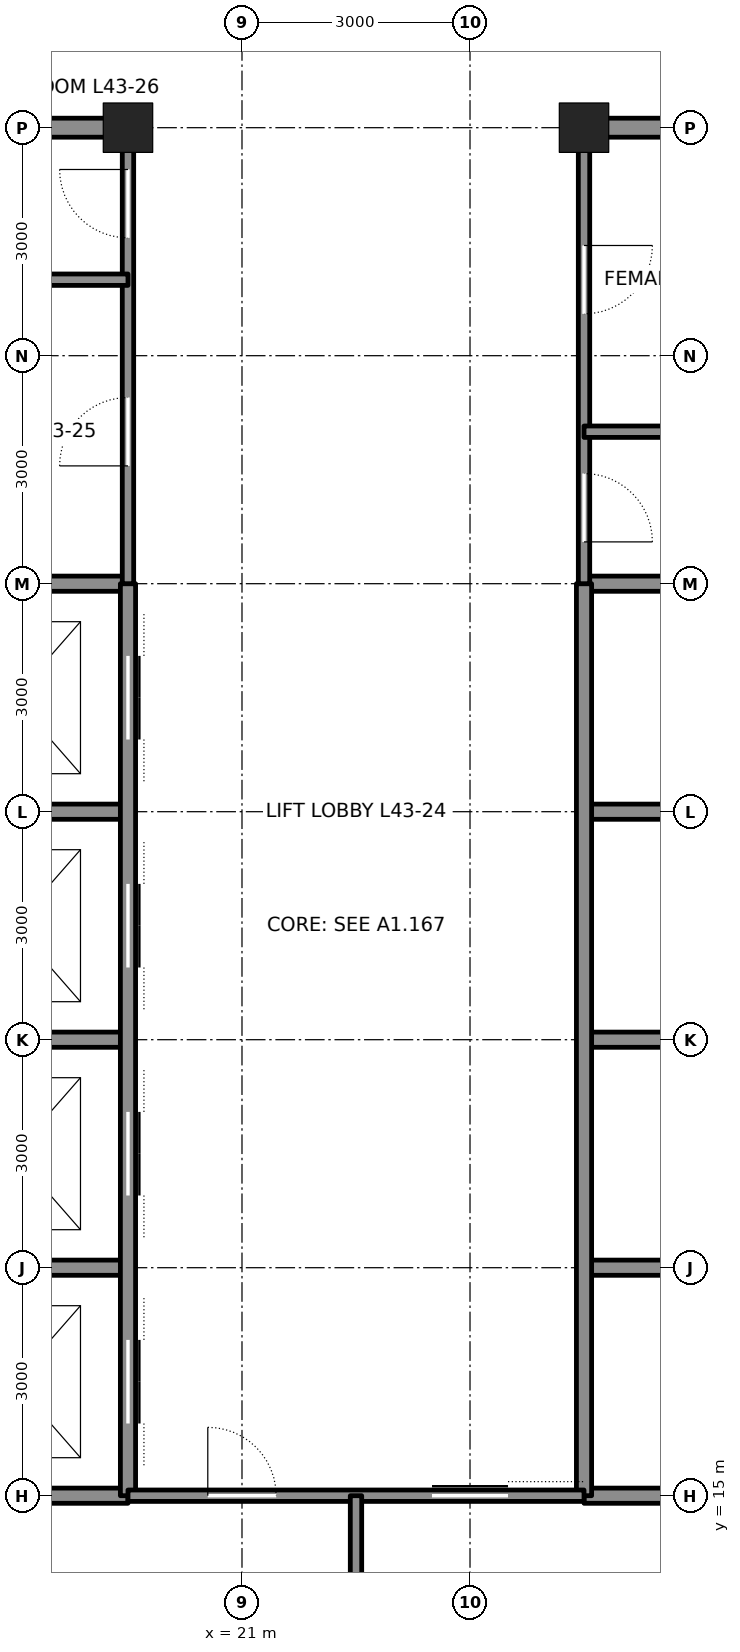
"""IFC4 building model, lengths in metres.
Left out: names, types, materials, properties, quantities, classifications, styles, units other than length and angle.
Written with IfcOpenShell. Run it as: python <this file> out.ifc"""

import sys

from ifc_helpers import new_model, si_unit, direction, frame, frame_2d, origin, origin_2d, place, context, subcontext, project, spatial, rectangle, hollow_rectangle, extrude, element, fill, save


model = new_model("IFC4")
c1 = context("Model", 3, precision=1e-05, world=origin(), true_north=direction((0.0, 1.0)))
c2 = subcontext(c1, "Body", "Model", "MODEL_VIEW")
j1 = project(units=[si_unit("LENGTHUNIT", "METRE"), si_unit("PLANEANGLEUNIT", "RADIAN")], contexts=[c1])
p1 = place(None, origin())
s1 = spatial("IfcSite", under=j1, at=p1, CompositionType="ELEMENT")
p2 = place(p1, origin())
s2 = spatial("IfcBuilding", under=s1, at=p2, CompositionType="ELEMENT")
p3 = place(p2, frame((0.0, 0.0, 197.1)))
s3 = spatial("IfcBuildingStorey", under=s2, at=p3, CompositionType="ELEMENT", Elevation=197.1)
for number, where, z_axis, x_axis in (
    (1, (19.5, 33.0, 0.0), (0.0, 0.0, 1.0), (1.0, 0.0, 0.0)),
    (2, (25.5, 33.0, 0.0), (0.0, 0.0, 1.0), (1.0, 0.0, 0.0)),
):
    element("IfcColumn", number, at=place(p3, frame(where, z_axis=z_axis, x_axis=x_axis)), inside=s3, PredefinedType="COLUMN", context=c2, shape_type="SweptSolid", body=[
        extrude(hollow_rectangle(XDim=0.65, YDim=0.65, WallThickness=0.065, at=origin_2d()), origin(), (0.0, 0.0, 1.0), 4.2),
    ])
for number, where, z_axis, x_axis in (
    (3, (12.0, 15.0, 0.0), (0.0, 0.0, 1.0), (1.0, 0.0, 0.0)),
    (4, (25.5, 15.0, 0.0), (0.0, 0.0, 1.0), (1.0, 0.0, 0.0)),
):
    element("IfcWall", number, at=place(p3, frame(where, z_axis=z_axis, x_axis=x_axis)), inside=s3, PredefinedType="SOLIDWALL", context=c2, shape_type="SweptSolid", body=[
        extrude(rectangle(XDim=7.5, YDim=0.2, at=frame_2d((3.75, 0.0))), origin(), (0.0, 0.0, 1.0), 4.04),
    ])
for number, where, z_axis, x_axis in (
    (5, (16.75, 24.0, 0.0), (0.0, 0.0, 1.0), (1.0, 0.0, 0.0)),
    (6, (25.5, 24.0, 0.0), (0.0, 0.0, 1.0), (1.0, 0.0, 0.0)),
):
    element("IfcWall", number, at=place(p3, frame(where, z_axis=z_axis, x_axis=x_axis)), inside=s3, PredefinedType="SOLIDWALL", context=c2, shape_type="SweptSolid", body=[
        extrude(rectangle(XDim=2.75, YDim=0.2, at=frame_2d((1.375, 0.0))), origin(), (0.0, 0.0, 1.0), 3.09),
    ])
p4 = place(p3, frame((12.0, 27.0, 0.0), z_axis=(0.0, 0.0, 1.0), x_axis=(1.0, 0.0, 0.0)))
e7 = element("IfcWall", 7, at=p4, inside=s3, PredefinedType="SOLIDWALL", context=c2, shape_type="SweptSolid", body=[
    extrude(rectangle(XDim=7.5, YDim=0.2, at=frame_2d((3.75, 0.0))), origin(), (0.0, 0.0, 1.0), 4.04),
])
p5 = place(p4, frame((1.65, 0.0, 0.0)))
e8 = element("IfcOpeningElement", 8, at=p5, cuts=e7, PredefinedType="OPENING", context=c2, shape_type="SweptSolid", body=[
    extrude(rectangle(XDim=1.2, YDim=2.1, at=frame_2d((0.6, 1.05))), frame((0.0, 0.11, 0.0), z_axis=(0.0, -1.0, 0.0), x_axis=(1.0, 0.0, 0.0)), (0.0, 0.0, 1.0), 0.22),
])
p6 = place(p3, frame((25.5, 27.0, 0.0), z_axis=(0.0, 0.0, 1.0), x_axis=(1.0, 0.0, 0.0)))
e9 = element("IfcWall", 9, at=p6, inside=s3, PredefinedType="SOLIDWALL", context=c2, shape_type="SweptSolid", body=[
    extrude(rectangle(XDim=3.0, YDim=0.2, at=frame_2d((1.5, 0.0))), origin(), (0.0, 0.0, 1.0), 4.04),
])
for number, where, z_axis, x_axis in (
    (10, (16.75, 33.0, 0.0), (0.0, 0.0, 1.0), (1.0, 0.0, 0.0)),
    (11, (25.75, 33.0, 0.0), (0.0, 0.0, 1.0), (1.0, 0.0, 0.0)),
):
    element("IfcWall", number, at=place(p3, frame(where, z_axis=z_axis, x_axis=x_axis)), inside=s3, PredefinedType="SOLIDWALL", context=c2, shape_type="SweptSolid", body=[
        extrude(rectangle(XDim=2.5, YDim=0.25, at=frame_2d((1.25, 0.0))), origin(), (0.0, 0.0, 1.0), 3.181),
    ])
p7 = place(p3, frame((16.5, 18.0, 0.0), z_axis=(0.0, 0.0, 1.0), x_axis=(1.0, 0.0, 0.0)))
e12 = element("IfcWall", 12, at=p7, inside=s3, PredefinedType="SOLIDWALL", context=c2, shape_type="SweptSolid", body=[
    extrude(rectangle(XDim=3.0, YDim=0.2, at=frame_2d((1.5, 0.0))), origin(), (0.0, 0.0, 1.0), 4.04),
])
p8 = place(p3, frame((25.5, 18.0, 0.0), z_axis=(0.0, 0.0, 1.0), x_axis=(1.0, 0.0, 0.0)))
e13 = element("IfcWall", 13, at=p8, inside=s3, PredefinedType="SOLIDWALL", context=c2, shape_type="SweptSolid", body=[
    extrude(rectangle(XDim=7.5, YDim=0.2, at=frame_2d((3.75, 0.0))), origin(), (0.0, 0.0, 1.0), 4.04),
])
p9 = place(p8, frame((4.65, 0.0, 0.0)))
e14 = element("IfcOpeningElement", 14, at=p9, cuts=e13, PredefinedType="OPENING", context=c2, shape_type="SweptSolid", body=[
    extrude(rectangle(XDim=1.2, YDim=2.1, at=frame_2d((0.6, 1.05))), frame((0.0, 0.11, 0.0), z_axis=(0.0, -1.0, 0.0), x_axis=(1.0, 0.0, 0.0)), (0.0, 0.0, 1.0), 0.22),
])
for number, where, z_axis, x_axis in (
    (15, (16.75, 21.0, 0.0), (0.0, 0.0, 1.0), (1.0, 0.0, 0.0)),
    (16, (25.5, 21.0, 0.0), (0.0, 0.0, 1.0), (1.0, 0.0, 0.0)),
):
    element("IfcWall", number, at=place(p3, frame(where, z_axis=z_axis, x_axis=x_axis)), inside=s3, PredefinedType="SOLIDWALL", context=c2, shape_type="SweptSolid", body=[
        extrude(rectangle(XDim=2.75, YDim=0.2, at=frame_2d((1.375, 0.0))), origin(), (0.0, 0.0, 1.0), 3.09),
    ])
p10 = place(p3, frame((19.5, 15.0, 0.0), z_axis=(0.0, 0.0, 1.0), x_axis=(0.0, 1.0, 0.0)))
e17 = element("IfcWall", 17, at=p10, inside=s3, PredefinedType="SOLIDWALL", context=c2, shape_type="SweptSolid", body=[
    extrude(rectangle(XDim=12.0, YDim=0.2, at=frame_2d((6.0, 0.0))), origin(), (0.0, 0.0, 1.0), 3.064),
])
p11 = place(p10, frame((0.95, 0.0, 0.0)))
e18 = element("IfcOpeningElement", 18, at=p11, cuts=e17, PredefinedType="OPENING", context=c2, shape_type="SweptSolid", body=[
    extrude(rectangle(XDim=1.1, YDim=2.1, at=frame_2d((0.55, 1.05))), frame((0.0, 0.11, 0.0), z_axis=(0.0, -1.0, 0.0), x_axis=(1.0, 0.0, 0.0)), (0.0, 0.0, 1.0), 0.22),
])
p12 = place(p10, frame((3.95, 0.0, 0.0)))
e19 = element("IfcOpeningElement", 19, at=p12, cuts=e17, PredefinedType="OPENING", context=c2, shape_type="SweptSolid", body=[
    extrude(rectangle(XDim=1.1, YDim=2.1, at=frame_2d((0.55, 1.05))), frame((0.0, 0.11, 0.0), z_axis=(0.0, -1.0, 0.0), x_axis=(1.0, 0.0, 0.0)), (0.0, 0.0, 1.0), 0.22),
])
p13 = place(p10, frame((6.95, 0.0, 0.0)))
e20 = element("IfcOpeningElement", 20, at=p13, cuts=e17, PredefinedType="OPENING", context=c2, shape_type="SweptSolid", body=[
    extrude(rectangle(XDim=1.1, YDim=2.1, at=frame_2d((0.55, 1.05))), frame((0.0, 0.11, 0.0), z_axis=(0.0, -1.0, 0.0), x_axis=(1.0, 0.0, 0.0)), (0.0, 0.0, 1.0), 0.22),
])
p14 = place(p10, frame((9.95, 0.0, 0.0)))
e21 = element("IfcOpeningElement", 21, at=p14, cuts=e17, PredefinedType="OPENING", context=c2, shape_type="SweptSolid", body=[
    extrude(rectangle(XDim=1.1, YDim=2.1, at=frame_2d((0.55, 1.05))), frame((0.0, 0.11, 0.0), z_axis=(0.0, -1.0, 0.0), x_axis=(1.0, 0.0, 0.0)), (0.0, 0.0, 1.0), 0.22),
])
p15 = place(p3, frame((19.5, 27.0, 0.0), z_axis=(0.0, 0.0, 1.0), x_axis=(0.0, 1.0, 0.0)))
e22 = element("IfcWall", 22, at=p15, inside=s3, PredefinedType="PARTITIONING", context=c2, shape_type="SweptSolid", body=[
    extrude(rectangle(XDim=5.75, YDim=0.15, at=frame_2d((2.875, 0.0))), origin(), (0.0, 0.0, 1.0), 3.064),
])
p16 = place(p15, frame((1.55, 0.0, 0.0)))
e23 = element("IfcOpeningElement", 23, at=p16, cuts=e22, PredefinedType="OPENING", context=c2, shape_type="SweptSolid", body=[
    extrude(rectangle(XDim=0.9, YDim=2.1, at=frame_2d((0.45, 1.05))), frame((0.0, 0.085, 0.0), z_axis=(0.0, -1.0, 0.0), x_axis=(1.0, 0.0, 0.0)), (0.0, 0.0, 1.0), 0.17),
])
p17 = place(p15, frame((4.55, 0.0, 0.0)))
e24 = element("IfcOpeningElement", 24, at=p17, cuts=e22, PredefinedType="OPENING", context=c2, shape_type="SweptSolid", body=[
    extrude(rectangle(XDim=0.9, YDim=2.1, at=frame_2d((0.45, 1.05))), frame((0.0, 0.085, 0.0), z_axis=(0.0, -1.0, 0.0), x_axis=(1.0, 0.0, 0.0)), (0.0, 0.0, 1.0), 0.17),
])
p18 = place(p3, frame((25.5, 15.0, 0.0), z_axis=(0.0, 0.0, 1.0), x_axis=(0.0, 1.0, 0.0)))
e25 = element("IfcWall", 25, at=p18, inside=s3, PredefinedType="SOLIDWALL", context=c2, shape_type="SweptSolid", body=[
    extrude(rectangle(XDim=12.0, YDim=0.2, at=frame_2d((6.0, 0.0))), origin(), (0.0, 0.0, 1.0), 3.064),
])
p19 = place(p3, frame((25.5, 27.0, 0.0), z_axis=(0.0, 0.0, 1.0), x_axis=(0.0, 1.0, 0.0)))
e26 = element("IfcWall", 26, at=p19, inside=s3, PredefinedType="PARTITIONING", context=c2, shape_type="SweptSolid", body=[
    extrude(rectangle(XDim=5.75, YDim=0.15, at=frame_2d((2.875, 0.0))), origin(), (0.0, 0.0, 1.0), 3.064),
])
p20 = place(p19, frame((0.55, 0.0, 0.0)))
e27 = element("IfcOpeningElement", 27, at=p20, cuts=e26, PredefinedType="OPENING", context=c2, shape_type="SweptSolid", body=[
    extrude(rectangle(XDim=0.9, YDim=2.1, at=frame_2d((0.45, 1.05))), frame((0.0, 0.085, 0.0), z_axis=(0.0, -1.0, 0.0), x_axis=(1.0, 0.0, 0.0)), (0.0, 0.0, 1.0), 0.17),
])
p21 = place(p19, frame((3.55, 0.0, 0.0)))
e28 = element("IfcOpeningElement", 28, at=p21, cuts=e26, PredefinedType="OPENING", context=c2, shape_type="SweptSolid", body=[
    extrude(rectangle(XDim=0.9, YDim=2.1, at=frame_2d((0.45, 1.05))), frame((0.0, 0.085, 0.0), z_axis=(0.0, -1.0, 0.0), x_axis=(1.0, 0.0, 0.0)), (0.0, 0.0, 1.0), 0.17),
])
p22 = place(p3, frame((19.5, 15.0, 0.0), z_axis=(0.0, 0.0, 1.0), x_axis=(1.0, 0.0, 0.0)))
e29 = element("IfcWall", 29, at=p22, inside=s3, PredefinedType="PARTITIONING", context=c2, shape_type="SweptSolid", body=[
    extrude(rectangle(XDim=6.0, YDim=0.15, at=frame_2d((3.0, 0.0))), origin(), (0.0, 0.0, 1.0), 4.04),
])
p23 = place(p22, frame((4.0, 0.0, 0.0)))
e30 = element("IfcOpeningElement", 30, at=p23, cuts=e29, PredefinedType="OPENING", context=c2, shape_type="SweptSolid", body=[
    extrude(rectangle(XDim=1.0, YDim=2.1, at=frame_2d((0.5, 1.05))), frame((0.0, 0.085, 0.0), z_axis=(0.0, -1.0, 0.0), x_axis=(1.0, 0.0, 0.0)), (0.0, 0.0, 1.0), 0.17),
])
p24 = place(p22, frame((1.05, 0.0, 0.0)))
e31 = element("IfcOpeningElement", 31, at=p24, cuts=e29, PredefinedType="OPENING", context=c2, shape_type="SweptSolid", body=[
    extrude(rectangle(XDim=0.9, YDim=2.1, at=frame_2d((0.45, 1.05))), frame((0.0, 0.085, 0.0), z_axis=(0.0, -1.0, 0.0), x_axis=(1.0, 0.0, 0.0)), (0.0, 0.0, 1.0), 0.17),
])
for number, where, z_axis, x_axis in (
    (32, (22.5, 15.0, 0.0), (0.0, 0.0, 1.0), (0.0, -1.0, 0.0)),
    (33, (16.5, 31.0, 0.0), (0.0, 0.0, 1.0), (1.0, 0.0, 0.0)),
    (34, (25.5, 29.0, 0.0), (0.0, 0.0, 1.0), (1.0, 0.0, 0.0)),
):
    element("IfcWall", number, at=place(p3, frame(where, z_axis=z_axis, x_axis=x_axis)), inside=s3, PredefinedType="PARTITIONING", context=c2, shape_type="SweptSolid", body=[
        extrude(rectangle(XDim=3.0, YDim=0.15, at=frame_2d((1.5, 0.0))), origin(), (0.0, 0.0, 1.0), 4.04),
    ])
p25 = place(p16, origin())
e35 = element("IfcDoor", 35, at=p25, inside=s3, OperationType="SINGLE_SWING_LEFT", PredefinedType="DOOR", context=c2, shape_type="SweptSolid", body=[
    extrude(rectangle(XDim=0.9, YDim=2.1, at=frame_2d((0.45, 1.05))), frame((0.0, 0.025, 0.0), z_axis=(0.0, -1.0, 0.0), x_axis=(1.0, 0.0, 0.0)), (0.0, 0.0, 1.0), 0.05),
])
fill(e23, e35)
p26 = place(p17, origin())
e36 = element("IfcDoor", 36, at=p26, inside=s3, OperationType="SINGLE_SWING_RIGHT", PredefinedType="DOOR", context=c2, shape_type="SweptSolid", body=[
    extrude(rectangle(XDim=0.9, YDim=2.1, at=frame_2d((0.45, 1.05))), frame((0.0, 0.025, 0.0), z_axis=(0.0, -1.0, 0.0), x_axis=(1.0, 0.0, 0.0)), (0.0, 0.0, 1.0), 0.05),
])
fill(e24, e36)
p27 = place(p20, frame((0.9, 0.0, 0.0), z_axis=(0.0, 0.0, 1.0), x_axis=(-1.0, 0.0, 0.0)))
e37 = element("IfcDoor", 37, at=p27, inside=s3, OperationType="SINGLE_SWING_RIGHT", PredefinedType="DOOR", context=c2, shape_type="SweptSolid", body=[
    extrude(rectangle(XDim=0.9, YDim=2.1, at=frame_2d((0.45, 1.05))), frame((0.0, 0.025, 0.0), z_axis=(0.0, -1.0, 0.0), x_axis=(1.0, 0.0, 0.0)), (0.0, 0.0, 1.0), 0.05),
])
fill(e27, e37)
p28 = place(p21, frame((0.9, 0.0, 0.0), z_axis=(0.0, 0.0, 1.0), x_axis=(-1.0, 0.0, 0.0)))
e38 = element("IfcDoor", 38, at=p28, inside=s3, OperationType="SINGLE_SWING_LEFT", PredefinedType="DOOR", context=c2, shape_type="SweptSolid", body=[
    extrude(rectangle(XDim=0.9, YDim=2.1, at=frame_2d((0.45, 1.05))), frame((0.0, 0.025, 0.0), z_axis=(0.0, -1.0, 0.0), x_axis=(1.0, 0.0, 0.0)), (0.0, 0.0, 1.0), 0.05),
])
fill(e28, e38)
p29 = place(p23, origin())
e39 = element("IfcDoor", 39, at=p29, inside=s3, OperationType="SLIDING_TO_LEFT", PredefinedType="DOOR", context=c2, shape_type="SweptSolid", body=[
    extrude(rectangle(XDim=1.0, YDim=2.1, at=frame_2d((0.5, 1.05))), frame((0.0, 0.025, 0.0), z_axis=(0.0, -1.0, 0.0), x_axis=(1.0, 0.0, 0.0)), (0.0, 0.0, 1.0), 0.05),
])
fill(e30, e39)
p30 = place(p24, origin())
e40 = element("IfcDoor", 40, at=p30, inside=s3, OperationType="SINGLE_SWING_LEFT", PredefinedType="DOOR", context=c2, shape_type="SweptSolid", body=[
    extrude(rectangle(XDim=0.9, YDim=2.1, at=frame_2d((0.45, 1.05))), frame((0.0, 0.025, 0.0), z_axis=(0.0, -1.0, 0.0), x_axis=(1.0, 0.0, 0.0)), (0.0, 0.0, 1.0), 0.05),
])
fill(e31, e40)
p31 = place(p11, origin())
e41 = element("IfcDoor", 41, at=p31, inside=s3, OperationType="DOUBLE_DOOR_SLIDING", PredefinedType="DOOR", context=c2, shape_type="SweptSolid", body=[
    extrude(rectangle(XDim=1.1, YDim=2.1, at=frame_2d((0.55, 1.05))), frame((0.0, 0.025, 0.0), z_axis=(0.0, -1.0, 0.0), x_axis=(1.0, 0.0, 0.0)), (0.0, 0.0, 1.0), 0.05),
])
fill(e18, e41)
p32 = place(p12, origin())
e42 = element("IfcDoor", 42, at=p32, inside=s3, OperationType="DOUBLE_DOOR_SLIDING", PredefinedType="DOOR", context=c2, shape_type="SweptSolid", body=[
    extrude(rectangle(XDim=1.1, YDim=2.1, at=frame_2d((0.55, 1.05))), frame((0.0, 0.025, 0.0), z_axis=(0.0, -1.0, 0.0), x_axis=(1.0, 0.0, 0.0)), (0.0, 0.0, 1.0), 0.05),
])
fill(e19, e42)
p33 = place(p13, origin())
e43 = element("IfcDoor", 43, at=p33, inside=s3, OperationType="DOUBLE_DOOR_SLIDING", PredefinedType="DOOR", context=c2, shape_type="SweptSolid", body=[
    extrude(rectangle(XDim=1.1, YDim=2.1, at=frame_2d((0.55, 1.05))), frame((0.0, 0.025, 0.0), z_axis=(0.0, -1.0, 0.0), x_axis=(1.0, 0.0, 0.0)), (0.0, 0.0, 1.0), 0.05),
])
fill(e20, e43)
p34 = place(p14, origin())
e44 = element("IfcDoor", 44, at=p34, inside=s3, OperationType="DOUBLE_DOOR_SLIDING", PredefinedType="DOOR", context=c2, shape_type="SweptSolid", body=[
    extrude(rectangle(XDim=1.1, YDim=2.1, at=frame_2d((0.55, 1.05))), frame((0.0, 0.025, 0.0), z_axis=(0.0, -1.0, 0.0), x_axis=(1.0, 0.0, 0.0)), (0.0, 0.0, 1.0), 0.05),
])
fill(e21, e44)
save(model, sys.argv[1])
